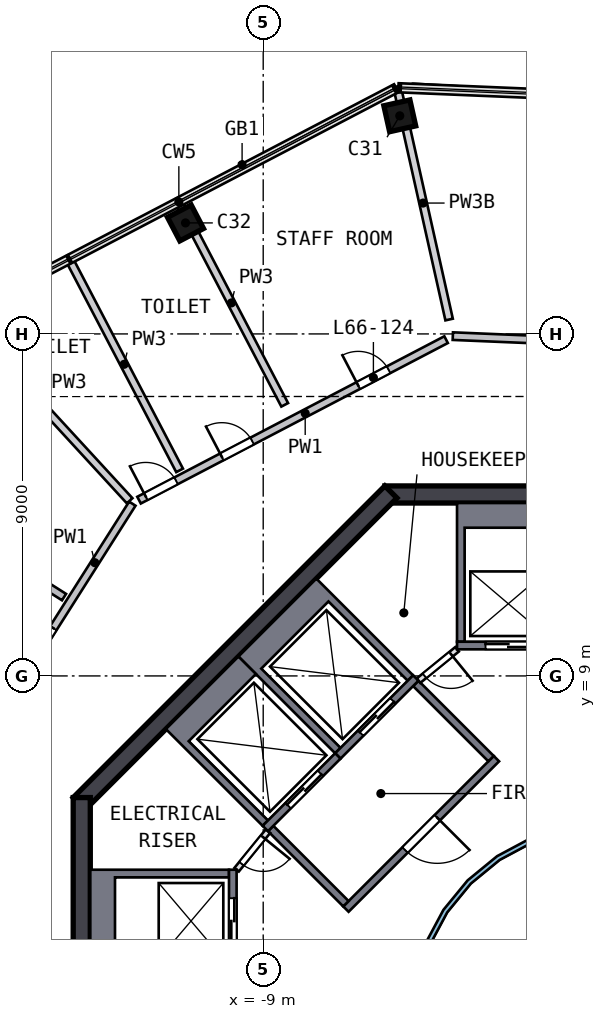
"""IFC4 building model, lengths in metres.
Left out: names, types, materials, properties, quantities, classifications, styles, units other than length and angle.
Written with IfcOpenShell. Run it as: python <this file> out.ifc"""

import sys

from ifc_helpers import new_model, si_unit, direction, frame, frame_2d, origin, origin_2d, place, context, subcontext, project, spatial, polyline, rectangle, outline, extrude, element, fill, save


model = new_model("IFC4")
c1 = context("Model", 3, precision=1e-05, world=origin(), true_north=direction((0.0, 1.0)))
c2 = subcontext(c1, "Body", "Model", "MODEL_VIEW")
j1 = project(units=[si_unit("LENGTHUNIT", "METRE"), si_unit("PLANEANGLEUNIT", "RADIAN")], contexts=[c1])
p1 = place(None, origin())
s1 = spatial("IfcSite", under=j1, at=p1, CompositionType="ELEMENT")
p2 = place(p1, origin())
s2 = spatial("IfcBuilding", under=s1, at=p2, CompositionType="ELEMENT")
p3 = place(p2, frame((0.0, 0.0, 269.0)))
s3 = spatial("IfcBuildingStorey", under=s2, at=p3, CompositionType="ELEMENT", Elevation=269.0)
p4 = place(p3, frame((-5.311, 23.762, 0.0), z_axis=(-0.079226457, -0.018418724, 0.99668647), x_axis=(0.972665981, 0.217497759, 0.081336422)))
e1 = element("IfcColumn", 1, at=p4, inside=s3, PredefinedType="COLUMN", context=c2, shape_type="SweptSolid", body=[
    extrude(rectangle(XDim=0.7, YDim=0.7, at=origin_2d()), origin(), (0.0, 0.0, 1.0), 4.706),
])
p5 = place(p3, frame((-10.961, 20.966, 0.0), z_axis=(-0.069744627, -0.037207513, 0.996870748), x_axis=(-0.88346195, -0.461786436, -0.079046004)))
e2 = element("IfcColumn", 2, at=p5, inside=s3, PredefinedType="COLUMN", context=c2, shape_type="SweptSolid", body=[
    extrude(rectangle(XDim=0.7, YDim=0.7, at=origin_2d()), origin(), (0.0, 0.0, 1.0), 4.705),
])
p6 = place(p3, frame((5.799, 13.775, 0.0), z_axis=(0.0, 0.0, 1.0), x_axis=(-1.0, 0.0, 0.0)))
e3 = element("IfcWall", 3, at=p6, inside=s3, PredefinedType="SHEAR", context=c2, shape_type="SweptSolid", body=[
    extrude(rectangle(XDim=11.598, YDim=0.45, at=frame_2d((5.799, 0.0))), origin(), (0.0, 0.0, 1.0), 5.0),
])
p7 = place(p6, frame((4.899, 0.0, 0.0)))
e4 = element("IfcOpeningElement", 4, at=p7, cuts=e3, PredefinedType="OPENING", context=c2, shape_type="SweptSolid", body=[
    extrude(rectangle(XDim=1.8, YDim=2.1, at=frame_2d((0.9, 1.05))), frame((0.0, 0.235, 0.0), z_axis=(0.0, -1.0, 0.0), x_axis=(1.0, 0.0, 0.0)), (0.0, 0.0, 1.0), 0.47),
])
p8 = place(p3, frame((-5.64, 13.841, 0.0), z_axis=(0.0, 0.0, 1.0), x_axis=(-0.707106781, -0.707106781, 0.0)))
e5 = element("IfcWall", 5, at=p8, inside=s3, PredefinedType="SHEAR", context=c2, shape_type="SweptSolid", body=[
    extrude(rectangle(XDim=11.598, YDim=0.45, at=frame_2d((5.799, 0.0))), origin(), (0.0, 0.0, 1.0), 5.0),
])
p9 = place(p3, frame((-13.775, 5.799, 0.0), z_axis=(0.0, 0.0, 1.0), x_axis=(0.0, -1.0, 0.0)))
e6 = element("IfcWall", 6, at=p9, inside=s3, PredefinedType="SHEAR", context=c2, shape_type="SweptSolid", body=[
    extrude(rectangle(XDim=11.598, YDim=0.45, at=frame_2d((5.799, 0.0))), origin(), (0.0, 0.0, 1.0), 5.0),
])
p10 = place(p9, frame((4.899, 0.0, 0.0)))
e7 = element("IfcOpeningElement", 7, at=p10, cuts=e6, PredefinedType="OPENING", context=c2, shape_type="SweptSolid", body=[
    extrude(rectangle(XDim=1.8, YDim=2.1, at=frame_2d((0.9, 1.05))), frame((0.0, 0.235, 0.0), z_axis=(0.0, -1.0, 0.0), x_axis=(1.0, 0.0, 0.0)), (0.0, 0.0, 1.0), 0.47),
])
p11 = place(p3, origin())
e8 = element("IfcWall", 8, at=p11, inside=s3, PredefinedType="SOLIDWALL", context=c2, shape_type="SweptSolid", body=[
    extrude(outline(polyline([(-3.9, 13.55), (-1.2, 13.55), (-1.2, 9.9), (-1.4, 9.9), (-1.4, 12.9), (-3.7, 12.9), (-3.7, 9.9), (-3.9, 9.9), (-3.9, 13.55)])), origin(), (0.0, 0.0, 1.0), 4.69),
])
p12 = place(p3, frame((-1.2, 9.8, 0.0), z_axis=(0.0, 0.0, 1.0), x_axis=(-1.0, 0.0, 0.0)))
e9 = element("IfcWall", 9, at=p12, inside=s3, PredefinedType="SOLIDWALL", context=c2, shape_type="SweptSolid", body=[
    extrude(rectangle(XDim=2.7, YDim=0.2, at=frame_2d((1.35, 0.0))), origin(), (0.0, 0.0, 1.0), 4.69),
])
p13 = place(p12, frame((0.75, 0.0, 0.0)))
e10 = element("IfcOpeningElement", 10, at=p13, cuts=e9, PredefinedType="OPENING", context=c2, shape_type="SweptSolid", body=[
    extrude(rectangle(XDim=1.2, YDim=2.1, at=frame_2d((0.6, 1.05))), frame((0.0, 0.11, 0.0), z_axis=(0.0, -1.0, 0.0), x_axis=(1.0, 0.0, 0.0)), (0.0, 0.0, 1.0), 0.22),
])
p14 = place(p3, origin())
e11 = element("IfcWall", 11, at=p14, inside=s3, PredefinedType="SOLIDWALL", context=c2, shape_type="SweptSolid", body=[
    extrude(outline(polyline([(-13.55, 3.9), (-9.9, 3.9), (-9.9, 3.7), (-12.9, 3.7), (-12.9, 1.4), (-9.9, 1.4), (-9.9, 1.2), (-13.55, 1.2), (-13.55, 3.9)])), origin(), (0.0, 0.0, 1.0), 4.69),
])
p15 = place(p3, frame((-9.8, 1.2, 0.0), z_axis=(0.0, 0.0, 1.0), x_axis=(0.0, 1.0, 0.0)))
e12 = element("IfcWall", 12, at=p15, inside=s3, PredefinedType="SOLIDWALL", context=c2, shape_type="SweptSolid", body=[
    extrude(rectangle(XDim=2.7, YDim=0.2, at=frame_2d((1.35, 0.0))), origin(), (0.0, 0.0, 1.0), 4.69),
])
p16 = place(p15, frame((0.75, 0.0, 0.0)))
e13 = element("IfcOpeningElement", 13, at=p16, cuts=e12, PredefinedType="OPENING", context=c2, shape_type="SweptSolid", body=[
    extrude(rectangle(XDim=1.2, YDim=2.1, at=frame_2d((0.6, 1.05))), frame((0.0, 0.11, 0.0), z_axis=(0.0, -1.0, 0.0), x_axis=(1.0, 0.0, 0.0)), (0.0, 0.0, 1.0), 0.22),
])
p17 = place(p3, origin())
e14 = element("IfcWall", 14, at=p17, inside=s3, PredefinedType="SOLIDWALL", context=c2, shape_type="SweptSolid", body=[
    extrude(outline(polyline([(-9.652, 9.51), (-7.601, 11.561), (-5.056, 9.016), (-5.197, 8.874), (-7.283, 10.96), (-9.051, 9.192), (-6.965, 7.106), (-7.106, 6.965), (-9.652, 9.51)])), origin(), (0.0, 0.0, 1.0), 4.69),
])
p18 = place(p3, frame((-4.985, 8.945, 0.0), z_axis=(0.0, 0.0, 1.0), x_axis=(-0.707106781, -0.707106781, 0.0)))
e15 = element("IfcWall", 15, at=p18, inside=s3, PredefinedType="SOLIDWALL", context=c2, shape_type="SweptSolid", body=[
    extrude(rectangle(XDim=2.9, YDim=0.2, at=frame_2d((1.45, 0.0))), origin(), (0.0, 0.0, 1.0), 4.69),
])
p19 = place(p18, frame((0.85, 0.0, 0.0)))
e16 = element("IfcOpeningElement", 16, at=p19, cuts=e15, PredefinedType="OPENING", context=c2, shape_type="SweptSolid", body=[
    extrude(rectangle(XDim=1.2, YDim=2.1, at=frame_2d((0.6, 1.05))), frame((0.0, 0.11, 0.0), z_axis=(0.0, -1.0, 0.0), x_axis=(1.0, 0.0, 0.0)), (0.0, 0.0, 1.0), 0.22),
])
p20 = place(p3, origin())
e17 = element("IfcWall", 17, at=p20, inside=s3, PredefinedType="SOLIDWALL", context=c2, shape_type="SweptSolid", body=[
    extrude(outline(polyline([(-11.561, 7.601), (-9.652, 9.51), (-9.192, 9.051), (-10.96, 7.283), (-8.874, 5.197), (-9.016, 5.056), (-11.561, 7.601)])), origin(), (0.0, 0.0, 1.0), 4.69),
])
p21 = place(p3, frame((-7.036, 6.894, 0.0), z_axis=(0.0, 0.0, 1.0), x_axis=(-0.707106781, -0.707106781, 0.0)))
e18 = element("IfcWall", 18, at=p21, inside=s3, PredefinedType="SOLIDWALL", context=c2, shape_type="SweptSolid", body=[
    extrude(rectangle(XDim=2.7, YDim=0.2, at=frame_2d((1.35, 0.0))), origin(), (0.0, 0.0, 1.0), 4.69),
])
p22 = place(p21, frame((0.65, 0.0, 0.0)))
e19 = element("IfcOpeningElement", 19, at=p22, cuts=e18, PredefinedType="OPENING", context=c2, shape_type="SweptSolid", body=[
    extrude(rectangle(XDim=1.2, YDim=2.1, at=frame_2d((0.6, 1.05))), frame((0.0, 0.11, 0.0), z_axis=(0.0, -1.0, 0.0), x_axis=(1.0, 0.0, 0.0)), (0.0, 0.0, 1.0), 0.22),
])
p23 = place(p3, frame((-2.864, 6.823, 0.0), z_axis=(0.0, 0.0, 1.0), x_axis=(-0.707106781, -0.707106781, 0.0)))
e20 = element("IfcWall", 20, at=p23, inside=s3, PredefinedType="SOLIDWALL", context=c2, shape_type="SweptSolid", body=[
    extrude(rectangle(XDim=5.6, YDim=0.2, at=frame_2d((2.8, 0.0))), origin(), (0.0, 0.0, 1.0), 4.69),
])
p24 = place(p23, frame((2.2, 0.0, 0.0)))
e21 = element("IfcOpeningElement", 21, at=p24, cuts=e20, PredefinedType="OPENING", context=c2, shape_type="SweptSolid", body=[
    extrude(rectangle(XDim=1.2, YDim=2.1, at=frame_2d((0.6, 1.05))), frame((0.0, 0.11, 0.0), z_axis=(0.0, -1.0, 0.0), x_axis=(1.0, 0.0, 0.0)), (0.0, 0.0, 1.0), 0.22),
])
for number, where, z_axis, x_axis in (
    (22, (-3.005, 6.823, 0.0), (0.0, 0.0, 1.0), (-0.707, 0.707, 0.0)),
    (23, (-6.823, 3.005, 0.0), (0.0, 0.0, 1.0), (-0.707, 0.707, 0.0)),
):
    element("IfcWall", number, at=place(p3, frame(where, z_axis=z_axis, x_axis=x_axis)), inside=s3, PredefinedType="SOLIDWALL", context=c2, shape_type="SweptSolid", body=[
        extrude(rectangle(XDim=2.8, YDim=0.2, at=frame_2d((1.4, 0.0))), origin(), (0.0, 0.0, 1.0), 4.69),
    ])
p25 = place(p3, frame((-3.9, 9.7, 0.0), z_axis=(0.0, 0.0, 1.0), x_axis=(-0.775559878, -0.631274009, 0.0)))
e24 = element("IfcWall", 24, at=p25, inside=s3, PredefinedType="PARTITIONING", context=c2, shape_type="SweptSolid", body=[
    extrude(rectangle(XDim=1.308, YDim=0.15, at=frame_2d((0.654, 0.0))), origin(), (0.0, 0.0, 1.0), 4.69),
])
p26 = place(p25, frame((0.204, 0.0, 0.0)))
e25 = element("IfcOpeningElement", 25, at=p26, cuts=e24, PredefinedType="OPENING", context=c2, shape_type="SweptSolid", body=[
    extrude(rectangle(XDim=0.9, YDim=2.1, at=frame_2d((0.45, 1.05))), frame((0.0, 0.085, 0.0), z_axis=(0.0, -1.0, 0.0), x_axis=(1.0, 0.0, 0.0)), (0.0, 0.0, 1.0), 0.17),
])
p27 = place(p3, frame((-8.874, 4.914, 0.0), z_axis=(0.0, 0.0, 1.0), x_axis=(-0.631274009, -0.775559878, 0.0)))
e26 = element("IfcWall", 26, at=p27, inside=s3, PredefinedType="PARTITIONING", context=c2, shape_type="SweptSolid", body=[
    extrude(rectangle(XDim=1.308, YDim=0.15, at=frame_2d((0.654, 0.0))), origin(), (0.0, 0.0, 1.0), 4.69),
])
p28 = place(p27, frame((0.204, 0.0, 0.0)))
e27 = element("IfcOpeningElement", 27, at=p28, cuts=e26, PredefinedType="OPENING", context=c2, shape_type="SweptSolid", body=[
    extrude(rectangle(XDim=0.9, YDim=2.1, at=frame_2d((0.45, 1.05))), frame((0.0, 0.085, 0.0), z_axis=(0.0, -1.0, 0.0), x_axis=(1.0, 0.0, 0.0)), (0.0, 0.0, 1.0), 0.17),
])
p29 = place(p3, origin())
e28 = element("IfcWall", 28, at=p29, inside=s3, PredefinedType="SOLIDWALL", context=c2, shape_type="SweptSolid", body=[
    extrude(outline(polyline([(5.021, -0.999), (4.73, -1.959), (4.257, -2.844), (3.62, -3.62), (2.844, -4.257), (1.959, -4.73), (0.999, -5.021), (0.0, -5.12), (-0.999, -5.021), (-1.959, -4.73), (-2.844, -4.257), (-3.62, -3.62), (-4.257, -2.844), (-4.73, -1.959), (-5.021, -0.999), (-5.12, 0.0), (-5.021, 0.999), (-4.73, 1.959), (-4.257, 2.844), (-3.62, 3.62), (-2.844, 4.257), (-1.959, 4.73), (-0.999, 5.021), (0.0, 5.12), (0.999, 5.021), (1.959, 4.73), (2.844, 4.257), (3.62, 3.62), (4.257, 2.844), (4.73, 1.959), (5.021, 0.999), (5.12, 0.0), (5.021, -0.999)]), holes=[polyline([(4.904, 0.976), (4.619, 1.913), (4.157, 2.778), (3.535, 3.535), (2.778, 4.157), (1.913, 4.619), (0.976, 4.904), (0.0, 5.0), (-0.976, 4.904), (-1.913, 4.619), (-2.778, 4.157), (-3.535, 3.535), (-4.157, 2.778), (-4.619, 1.913), (-4.904, 0.976), (-5.0, 0.0), (-4.904, -0.976), (-4.619, -1.913), (-4.157, -2.778), (-3.535, -3.535), (-2.778, -4.157), (-1.913, -4.619), (-0.976, -4.904), (0.0, -5.0), (0.976, -4.904), (1.913, -4.619), (2.778, -4.157), (3.535, -3.535), (4.157, -2.778), (4.619, -1.913), (4.904, -0.976), (5.0, 0.0), (4.904, 0.976)])]), origin(), (0.0, 0.0, 1.0), 4.69),
])
p30 = place(p3, frame((-17.436, 5.667, 0.0), z_axis=(0.0, 0.0, 1.0), x_axis=(0.535837373, 0.844321212, 0.0)))
e29 = element("IfcWall", 29, at=p30, inside=s3, PredefinedType="SOLIDWALL", context=c2, shape_type="SweptSolid", body=[
    extrude(rectangle(XDim=9.317, YDim=0.2, at=frame_2d((4.658, 0.0))), origin(), (0.0, 0.0, 1.0), 4.69),
])
p31 = place(p30, frame((3.637, 0.0, 0.0)))
e30 = element("IfcOpeningElement", 30, at=p31, cuts=e29, PredefinedType="OPENING", context=c2, shape_type="SweptSolid", body=[
    extrude(rectangle(XDim=1.8, YDim=2.1, at=frame_2d((0.9, 1.05))), frame((0.0, 0.11, 0.0), z_axis=(0.0, -1.0, 0.0), x_axis=(1.0, 0.0, 0.0)), (0.0, 0.0, 1.0), 0.22),
])
p32 = place(p3, frame((-12.267, 13.625, 0.0), z_axis=(0.0, 0.0, 1.0), x_axis=(0.886199207, 0.463304399, 0.0)))
e31 = element("IfcWall", 31, at=p32, inside=s3, PredefinedType="SOLIDWALL", context=c2, shape_type="SweptSolid", body=[
    extrude(rectangle(XDim=9.117, YDim=0.2, at=frame_2d((4.559, 0.0))), origin(), (0.0, 0.0, 1.0), 4.69),
])
p33 = place(p32, frame((6.508, 0.0, 0.0)))
e32 = element("IfcOpeningElement", 32, at=p33, cuts=e31, PredefinedType="OPENING", context=c2, shape_type="SweptSolid", body=[
    extrude(rectangle(XDim=0.9, YDim=2.1, at=frame_2d((0.45, 1.05))), frame((0.0, 0.11, 0.0), z_axis=(0.0, -1.0, 0.0), x_axis=(1.0, 0.0, 0.0)), (0.0, 0.0, 1.0), 0.22),
])
p34 = place(p32, frame((2.458, 0.0, 0.0)))
e33 = element("IfcOpeningElement", 33, at=p34, cuts=e31, PredefinedType="OPENING", context=c2, shape_type="SweptSolid", body=[
    extrude(rectangle(XDim=0.9, YDim=2.1, at=frame_2d((0.45, 1.05))), frame((0.0, 0.11, 0.0), z_axis=(0.0, -1.0, 0.0), x_axis=(1.0, 0.0, 0.0)), (0.0, 0.0, 1.0), 0.22),
])
p35 = place(p32, frame((0.2, 0.0, 0.0)))
e34 = element("IfcOpeningElement", 34, at=p35, cuts=e31, PredefinedType="OPENING", context=c2, shape_type="SweptSolid", body=[
    extrude(rectangle(XDim=0.9, YDim=2.1, at=frame_2d((0.45, 1.05))), frame((0.0, 0.11, 0.0), z_axis=(0.0, -1.0, 0.0), x_axis=(1.0, 0.0, 0.0)), (0.0, 0.0, 1.0), 0.22),
])
p36 = place(p3, frame((-4.01, 17.942, 0.0), z_axis=(0.0, 0.0, 1.0), x_axis=(0.999123175, -0.041867432, 0.0)))
e35 = element("IfcWall", 35, at=p36, inside=s3, PredefinedType="SOLIDWALL", context=c2, shape_type="SweptSolid", body=[
    extrude(rectangle(XDim=9.517, YDim=0.2, at=frame_2d((4.758, 0.0))), origin(), (0.0, 0.0, 1.0), 4.69),
])
p37 = place(p36, frame((6.25, 0.0, 0.0)))
e36 = element("IfcOpeningElement", 36, at=p37, cuts=e35, PredefinedType="OPENING", context=c2, shape_type="SweptSolid", body=[
    extrude(rectangle(XDim=1.8, YDim=2.1, at=frame_2d((0.9, 1.05))), frame((0.0, 0.11, 0.0), z_axis=(0.0, -1.0, 0.0), x_axis=(1.0, 0.0, 0.0)), (0.0, 0.0, 1.0), 0.22),
])
p38 = place(p3, frame((-22.939, 16.594, 0.0), z_axis=(0.0, 0.0, 1.0), x_axis=(0.844330245, -0.53582314, 0.0)))
e37 = element("IfcWall", 37, at=p38, inside=s3, PredefinedType="SOLIDWALL", context=c2, shape_type="SweptSolid", body=[
    extrude(rectangle(XDim=10.302, YDim=0.2, at=frame_2d((5.151, 0.0))), origin(), (0.0, 0.0, 1.0), 4.69),
])
p39 = place(p38, frame((2.5, 0.0, 0.0)))
e38 = element("IfcOpeningElement", 38, at=p39, cuts=e37, PredefinedType="OPENING", context=c2, shape_type="SweptSolid", body=[
    extrude(rectangle(XDim=1.0, YDim=2.1, at=frame_2d((0.5, 1.05))), frame((0.0, 0.11, 0.0), z_axis=(0.0, -1.0, 0.0), x_axis=(1.0, 0.0, 0.0)), (0.0, 0.0, 1.0), 0.22),
])
p40 = place(p3, frame((-16.999, 18.486, 0.0), z_axis=(0.0, 0.0, 1.0), x_axis=(0.676860133, -0.736111649, 0.0)))
e39 = element("IfcWall", 39, at=p40, inside=s3, PredefinedType="SOLIDWALL", context=c2, shape_type="SweptSolid", body=[
    extrude(rectangle(XDim=6.626, YDim=0.2, at=frame_2d((3.313, 0.0))), origin(), (0.0, 0.0, 1.0), 4.69),
])
p41 = place(p3, frame((-11.2, 14.409, 0.0), z_axis=(0.0, 0.0, 1.0), x_axis=(-0.463277036, 0.886213512, 0.0)))
e40 = element("IfcWall", 40, at=p41, inside=s3, PredefinedType="SOLIDWALL", context=c2, shape_type="SweptSolid", body=[
    extrude(rectangle(XDim=6.3, YDim=0.2, at=frame_2d((3.15, 0.0))), origin(), (0.0, 0.0, 1.0), 4.69),
])
p42 = place(p3, frame((-8.435, 16.134, 0.0), z_axis=(0.0, 0.0, 1.0), x_axis=(-0.463290928, 0.886206249, 0.0)))
e41 = element("IfcWall", 41, at=p42, inside=s3, PredefinedType="SOLIDWALL", context=c2, shape_type="SweptSolid", body=[
    extrude(rectangle(XDim=6.053, YDim=0.2, at=frame_2d((3.026, 0.0))), origin(), (0.0, 0.0, 1.0), 4.69),
])
p43 = place(p3, frame((-4.108, 18.378, 0.0), z_axis=(0.0, 0.0, 1.0), x_axis=(-0.218135948, 0.975918392, 0.0)))
e42 = element("IfcWall", 42, at=p43, inside=s3, PredefinedType="SOLIDWALL", context=c2, shape_type="SweptSolid", body=[
    extrude(rectangle(XDim=6.282, YDim=0.2, at=frame_2d((3.141, 0.0))), origin(), (0.0, 0.0, 1.0), 4.19),
])
p44 = place(p13, origin())
e43 = element("IfcDoor", 43, at=p44, inside=s3, OperationType="DOUBLE_DOOR_SLIDING", PredefinedType="DOOR", context=c2, shape_type="SweptSolid", body=[
    extrude(rectangle(XDim=1.2, YDim=2.1, at=frame_2d((0.6, 1.05))), frame((0.0, 0.025, 0.0), z_axis=(0.0, -1.0, 0.0), x_axis=(1.0, 0.0, 0.0)), (0.0, 0.0, 1.0), 0.05),
])
fill(e10, e43)
p45 = place(p16, origin())
e44 = element("IfcDoor", 44, at=p45, inside=s3, OperationType="DOUBLE_DOOR_SLIDING", PredefinedType="DOOR", context=c2, shape_type="SweptSolid", body=[
    extrude(rectangle(XDim=1.2, YDim=2.1, at=frame_2d((0.6, 1.05))), frame((0.0, 0.025, 0.0), z_axis=(0.0, -1.0, 0.0), x_axis=(1.0, 0.0, 0.0)), (0.0, 0.0, 1.0), 0.05),
])
fill(e13, e44)
p46 = place(p19, origin())
e45 = element("IfcDoor", 45, at=p46, inside=s3, OperationType="DOUBLE_DOOR_SLIDING", PredefinedType="DOOR", context=c2, shape_type="SweptSolid", body=[
    extrude(rectangle(XDim=1.2, YDim=2.1, at=frame_2d((0.6, 1.05))), frame((0.0, 0.025, 0.0), z_axis=(0.0, -1.0, 0.0), x_axis=(1.0, 0.0, 0.0)), (0.0, 0.0, 1.0), 0.05),
])
fill(e16, e45)
p47 = place(p22, origin())
e46 = element("IfcDoor", 46, at=p47, inside=s3, OperationType="DOUBLE_DOOR_SLIDING", PredefinedType="DOOR", context=c2, shape_type="SweptSolid", body=[
    extrude(rectangle(XDim=1.2, YDim=2.1, at=frame_2d((0.6, 1.05))), frame((0.0, 0.025, 0.0), z_axis=(0.0, -1.0, 0.0), x_axis=(1.0, 0.0, 0.0)), (0.0, 0.0, 1.0), 0.05),
])
fill(e19, e46)
p48 = place(p24, origin())
e47 = element("IfcDoor", 47, at=p48, inside=s3, OperationType="SINGLE_SWING_LEFT", PredefinedType="DOOR", context=c2, shape_type="SweptSolid", body=[
    extrude(rectangle(XDim=1.2, YDim=2.1, at=frame_2d((0.6, 1.05))), frame((0.0, 0.025, 0.0), z_axis=(0.0, -1.0, 0.0), x_axis=(1.0, 0.0, 0.0)), (0.0, 0.0, 1.0), 0.05),
])
fill(e21, e47)
p49 = place(p26, origin())
e48 = element("IfcDoor", 48, at=p49, inside=s3, OperationType="SINGLE_SWING_LEFT", PredefinedType="DOOR", context=c2, shape_type="SweptSolid", body=[
    extrude(rectangle(XDim=0.9, YDim=2.1, at=frame_2d((0.45, 1.05))), frame((0.0, 0.025, 0.0), z_axis=(0.0, -1.0, 0.0), x_axis=(1.0, 0.0, 0.0)), (0.0, 0.0, 1.0), 0.05),
])
fill(e25, e48)
p50 = place(p28, origin())
e49 = element("IfcDoor", 49, at=p50, inside=s3, OperationType="SINGLE_SWING_LEFT", PredefinedType="DOOR", context=c2, shape_type="SweptSolid", body=[
    extrude(rectangle(XDim=0.9, YDim=2.1, at=frame_2d((0.45, 1.05))), frame((0.0, 0.025, 0.0), z_axis=(0.0, -1.0, 0.0), x_axis=(1.0, 0.0, 0.0)), (0.0, 0.0, 1.0), 0.05),
])
fill(e27, e49)
p51 = place(p31, origin())
e50 = element("IfcDoor", 50, at=p51, inside=s3, OperationType="DOUBLE_DOOR_SINGLE_SWING", PredefinedType="DOOR", context=c2, shape_type="SweptSolid", body=[
    extrude(rectangle(XDim=1.8, YDim=2.1, at=frame_2d((0.9, 1.05))), frame((0.0, 0.025, 0.0), z_axis=(0.0, -1.0, 0.0), x_axis=(1.0, 0.0, 0.0)), (0.0, 0.0, 1.0), 0.05),
])
fill(e30, e50)
p52 = place(p33, origin())
e51 = element("IfcDoor", 51, at=p52, inside=s3, OperationType="SINGLE_SWING_LEFT", PredefinedType="DOOR", context=c2, shape_type="SweptSolid", body=[
    extrude(rectangle(XDim=0.9, YDim=2.1, at=frame_2d((0.45, 1.05))), frame((0.0, 0.025, 0.0), z_axis=(0.0, -1.0, 0.0), x_axis=(1.0, 0.0, 0.0)), (0.0, 0.0, 1.0), 0.05),
])
fill(e32, e51)
p53 = place(p34, origin())
e52 = element("IfcDoor", 52, at=p53, inside=s3, OperationType="SINGLE_SWING_LEFT", PredefinedType="DOOR", context=c2, shape_type="SweptSolid", body=[
    extrude(rectangle(XDim=0.9, YDim=2.1, at=frame_2d((0.45, 1.05))), frame((0.0, 0.025, 0.0), z_axis=(0.0, -1.0, 0.0), x_axis=(1.0, 0.0, 0.0)), (0.0, 0.0, 1.0), 0.05),
])
fill(e33, e52)
p54 = place(p35, origin())
e53 = element("IfcDoor", 53, at=p54, inside=s3, OperationType="SINGLE_SWING_LEFT", PredefinedType="DOOR", context=c2, shape_type="SweptSolid", body=[
    extrude(rectangle(XDim=0.9, YDim=2.1, at=frame_2d((0.45, 1.05))), frame((0.0, 0.025, 0.0), z_axis=(0.0, -1.0, 0.0), x_axis=(1.0, 0.0, 0.0)), (0.0, 0.0, 1.0), 0.05),
])
fill(e34, e53)
save(model, sys.argv[1])
